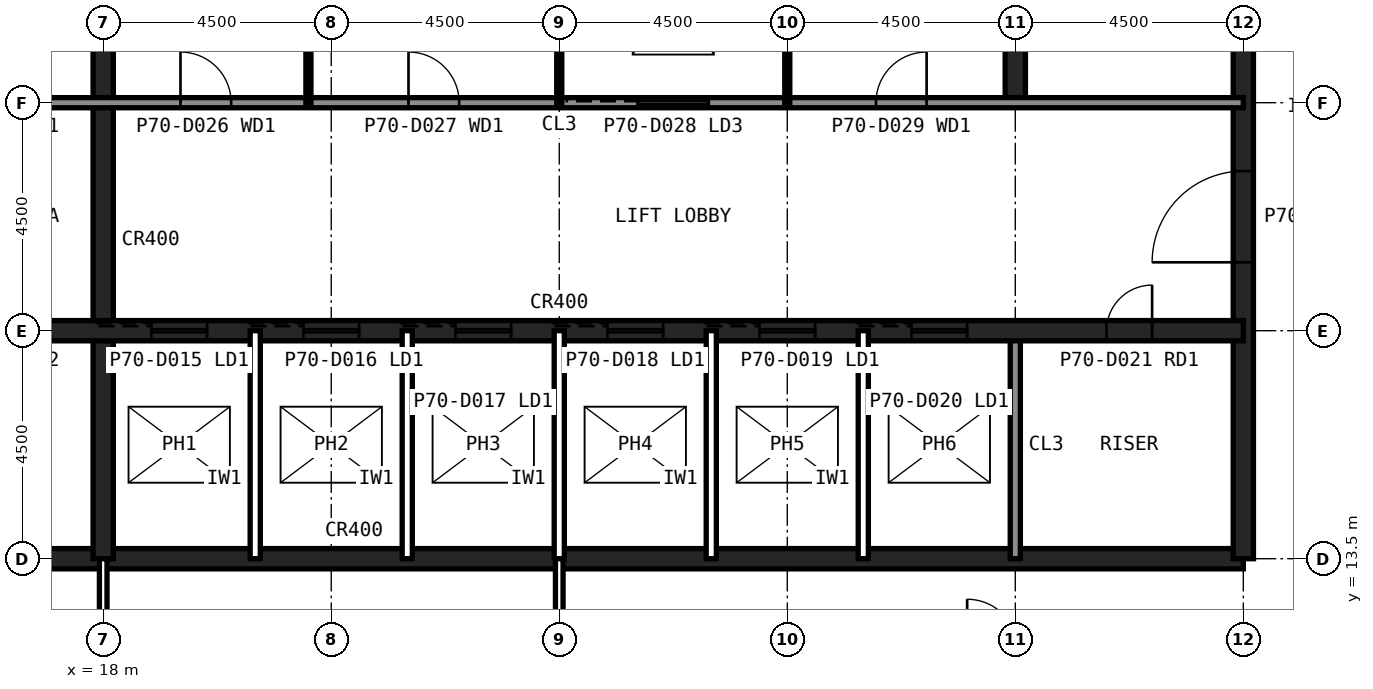
"""IFC4 building model, lengths in metres.
Left out: names, types, materials, properties, quantities, classifications, styles, units other than length and angle.
Written with IfcOpenShell. Run it as: python <this file> out.ifc"""

import sys

from ifc_helpers import new_model, si_unit, direction, frame, frame_2d, origin, place, context, subcontext, project, spatial, rectangle, extrude, element, fill, save


model = new_model("IFC4")
c1 = context("Model", 3, precision=1e-05, world=origin(), true_north=direction((0.0, 1.0)))
c2 = subcontext(c1, "Body", "Model", "MODEL_VIEW")
j1 = project(units=[si_unit("LENGTHUNIT", "METRE"), si_unit("PLANEANGLEUNIT", "RADIAN")], contexts=[c1])
p1 = place(None, origin())
s1 = spatial("IfcSite", under=j1, at=p1, CompositionType="ELEMENT")
p2 = place(p1, origin())
s2 = spatial("IfcBuilding", under=s1, at=p2, CompositionType="ELEMENT")
p3 = place(p2, frame((0.0, 0.0, 294.6)))
s3 = spatial("IfcBuildingStorey", under=s2, at=p3, CompositionType="ELEMENT", Elevation=294.6)
p4 = place(p3, frame((13.5, 13.5, 0.0), z_axis=(0.0, 0.0, 1.0), x_axis=(1.0, 0.0, 0.0)))
e1 = element("IfcWall", 1, at=p4, inside=s3, PredefinedType="SHEAR", context=c2, shape_type="SweptSolid", body=[
    extrude(rectangle(XDim=27.0, YDim=0.4, at=frame_2d((13.5, 0.0))), origin(), (0.0, 0.0, 1.0), 4.0),
])
p5 = place(p3, frame((40.5, 13.5, 0.0), z_axis=(0.0, 0.0, 1.0), x_axis=(0.0, 1.0, 0.0)))
e2 = element("IfcWall", 2, at=p5, inside=s3, PredefinedType="SHEAR", context=c2, shape_type="SweptSolid", body=[
    extrude(rectangle(XDim=27.0, YDim=0.4, at=frame_2d((13.5, 0.0))), origin(), (0.0, 0.0, 1.0), 4.0),
])
p6 = place(p5, frame((5.85, 0.0, 0.0)))
e3 = element("IfcOpeningElement", 3, at=p6, cuts=e2, PredefinedType="OPENING", context=c2, shape_type="SweptSolid", body=[
    extrude(rectangle(XDim=1.8, YDim=2.1, at=frame_2d((0.9, 1.05))), frame((0.0, 0.21, 0.0), z_axis=(0.0, -1.0, 0.0), x_axis=(1.0, 0.0, 0.0)), (0.0, 0.0, 1.0), 0.42),
])
p7 = place(p5, frame((19.65, 0.0, 0.0)))
e4 = element("IfcOpeningElement", 4, at=p7, cuts=e2, PredefinedType="OPENING", context=c2, shape_type="SweptSolid", body=[
    extrude(rectangle(XDim=1.2, YDim=2.1, at=frame_2d((0.6, 1.05))), frame((0.0, 0.21, 0.0), z_axis=(0.0, -1.0, 0.0), x_axis=(1.0, 0.0, 0.0)), (0.0, 0.0, 1.0), 0.42),
])
p8 = place(p3, frame((18.0, 13.5, 0.0), z_axis=(0.0, 0.0, 1.0), x_axis=(0.0, 1.0, 0.0)))
e5 = element("IfcWall", 5, at=p8, inside=s3, PredefinedType="SHEAR", context=c2, shape_type="SweptSolid", body=[
    extrude(rectangle(XDim=18.0, YDim=0.4, at=frame_2d((9.0, 0.0))), origin(), (0.0, 0.0, 1.0), 4.0),
])
p9 = place(p3, frame((36.0, 13.5, 0.0), z_axis=(0.0, 0.0, 1.0), x_axis=(0.0, 1.0, 0.0)))
e6 = element("IfcWall", 6, at=p9, inside=s3, PredefinedType="SOLIDWALL", context=c2, shape_type="SweptSolid", body=[
    extrude(rectangle(XDim=4.5, YDim=0.2, at=frame_2d((2.25, 0.0))), origin(), (0.0, 0.0, 1.0), 3.84),
])
p10 = place(p3, frame((36.0, 22.5, 0.0), z_axis=(0.0, 0.0, 1.0), x_axis=(0.0, 1.0, 0.0)))
e7 = element("IfcWall", 7, at=p10, inside=s3, PredefinedType="SHEAR", context=c2, shape_type="SweptSolid", body=[
    extrude(rectangle(XDim=18.0, YDim=0.4, at=frame_2d((9.0, 0.0))), origin(), (0.0, 0.0, 1.0), 4.0),
])
p11 = place(p3, frame((13.5, 18.0, 0.0), z_axis=(0.0, 0.0, 1.0), x_axis=(1.0, 0.0, 0.0)))
e8 = element("IfcWall", 8, at=p11, inside=s3, PredefinedType="SHEAR", context=c2, shape_type="SweptSolid", body=[
    extrude(rectangle(XDim=27.0, YDim=0.4, at=frame_2d((13.5, 0.0))), origin(), (0.0, 0.0, 1.0), 4.0),
])
p12 = place(p11, frame((24.3, 0.0, 0.0)))
e9 = element("IfcOpeningElement", 9, at=p12, cuts=e8, PredefinedType="OPENING", context=c2, shape_type="SweptSolid", body=[
    extrude(rectangle(XDim=0.9, YDim=2.1, at=frame_2d((0.45, 1.05))), frame((0.0, 0.21, 0.0), z_axis=(0.0, -1.0, 0.0), x_axis=(1.0, 0.0, 0.0)), (0.0, 0.0, 1.0), 0.42),
])
p13 = place(p11, frame((5.45, 0.0, 0.0)))
e10 = element("IfcOpeningElement", 10, at=p13, cuts=e8, PredefinedType="OPENING", context=c2, shape_type="SweptSolid", body=[
    extrude(rectangle(XDim=1.1, YDim=2.1, at=frame_2d((0.55, 1.05))), frame((0.0, 0.21, 0.0), z_axis=(0.0, -1.0, 0.0), x_axis=(1.0, 0.0, 0.0)), (0.0, 0.0, 1.0), 0.42),
])
p14 = place(p11, frame((8.45, 0.0, 0.0)))
e11 = element("IfcOpeningElement", 11, at=p14, cuts=e8, PredefinedType="OPENING", context=c2, shape_type="SweptSolid", body=[
    extrude(rectangle(XDim=1.1, YDim=2.1, at=frame_2d((0.55, 1.05))), frame((0.0, 0.21, 0.0), z_axis=(0.0, -1.0, 0.0), x_axis=(1.0, 0.0, 0.0)), (0.0, 0.0, 1.0), 0.42),
])
p15 = place(p11, frame((11.45, 0.0, 0.0)))
e12 = element("IfcOpeningElement", 12, at=p15, cuts=e8, PredefinedType="OPENING", context=c2, shape_type="SweptSolid", body=[
    extrude(rectangle(XDim=1.1, YDim=2.1, at=frame_2d((0.55, 1.05))), frame((0.0, 0.21, 0.0), z_axis=(0.0, -1.0, 0.0), x_axis=(1.0, 0.0, 0.0)), (0.0, 0.0, 1.0), 0.42),
])
p16 = place(p11, frame((14.45, 0.0, 0.0)))
e13 = element("IfcOpeningElement", 13, at=p16, cuts=e8, PredefinedType="OPENING", context=c2, shape_type="SweptSolid", body=[
    extrude(rectangle(XDim=1.1, YDim=2.1, at=frame_2d((0.55, 1.05))), frame((0.0, 0.21, 0.0), z_axis=(0.0, -1.0, 0.0), x_axis=(1.0, 0.0, 0.0)), (0.0, 0.0, 1.0), 0.42),
])
p17 = place(p11, frame((17.45, 0.0, 0.0)))
e14 = element("IfcOpeningElement", 14, at=p17, cuts=e8, PredefinedType="OPENING", context=c2, shape_type="SweptSolid", body=[
    extrude(rectangle(XDim=1.1, YDim=2.1, at=frame_2d((0.55, 1.05))), frame((0.0, 0.21, 0.0), z_axis=(0.0, -1.0, 0.0), x_axis=(1.0, 0.0, 0.0)), (0.0, 0.0, 1.0), 0.42),
])
p18 = place(p11, frame((20.45, 0.0, 0.0)))
e15 = element("IfcOpeningElement", 15, at=p18, cuts=e8, PredefinedType="OPENING", context=c2, shape_type="SweptSolid", body=[
    extrude(rectangle(XDim=1.1, YDim=2.1, at=frame_2d((0.55, 1.05))), frame((0.0, 0.21, 0.0), z_axis=(0.0, -1.0, 0.0), x_axis=(1.0, 0.0, 0.0)), (0.0, 0.0, 1.0), 0.42),
])
p19 = place(p11, frame((1.6, 0.0, 0.0)))
e16 = element("IfcOpeningElement", 16, at=p19, cuts=e8, PredefinedType="OPENING", context=c2, shape_type="SweptSolid", body=[
    extrude(rectangle(XDim=1.3, YDim=2.2, at=frame_2d((0.65, 1.1))), frame((0.0, 0.21, 0.0), z_axis=(0.0, -1.0, 0.0), x_axis=(1.0, 0.0, 0.0)), (0.0, 0.0, 1.0), 0.42),
])
p20 = place(p3, frame((13.5, 22.5, 0.0), z_axis=(0.0, 0.0, 1.0), x_axis=(1.0, 0.0, 0.0)))
e17 = element("IfcWall", 17, at=p20, inside=s3, PredefinedType="SOLIDWALL", context=c2, shape_type="SweptSolid", body=[
    extrude(rectangle(XDim=27.0, YDim=0.2, at=frame_2d((13.5, 0.0))), origin(), (0.0, 0.0, 1.0), 3.84),
])
p21 = place(p20, frame((1.65, 0.0, 0.0)))
e18 = element("IfcOpeningElement", 18, at=p21, cuts=e17, PredefinedType="OPENING", context=c2, shape_type="SweptSolid", body=[
    extrude(rectangle(XDim=1.2, YDim=2.1, at=frame_2d((0.6, 1.05))), frame((0.0, 0.11, 0.0), z_axis=(0.0, -1.0, 0.0), x_axis=(1.0, 0.0, 0.0)), (0.0, 0.0, 1.0), 0.22),
])
p22 = place(p20, frame((6.025, 0.0, 0.0)))
e19 = element("IfcOpeningElement", 19, at=p22, cuts=e17, PredefinedType="OPENING", context=c2, shape_type="SweptSolid", body=[
    extrude(rectangle(XDim=1.0, YDim=2.1, at=frame_2d((0.5, 1.05))), frame((0.0, 0.11, 0.0), z_axis=(0.0, -1.0, 0.0), x_axis=(1.0, 0.0, 0.0)), (0.0, 0.0, 1.0), 0.22),
])
p23 = place(p20, frame((10.525, 0.0, 0.0)))
e20 = element("IfcOpeningElement", 20, at=p23, cuts=e17, PredefinedType="OPENING", context=c2, shape_type="SweptSolid", body=[
    extrude(rectangle(XDim=1.0, YDim=2.1, at=frame_2d((0.5, 1.05))), frame((0.0, 0.11, 0.0), z_axis=(0.0, -1.0, 0.0), x_axis=(1.0, 0.0, 0.0)), (0.0, 0.0, 1.0), 0.22),
])
p24 = place(p20, frame((19.75, 0.0, 0.0)))
e21 = element("IfcOpeningElement", 21, at=p24, cuts=e17, PredefinedType="OPENING", context=c2, shape_type="SweptSolid", body=[
    extrude(rectangle(XDim=1.0, YDim=2.1, at=frame_2d((0.5, 1.05))), frame((0.0, 0.11, 0.0), z_axis=(0.0, -1.0, 0.0), x_axis=(1.0, 0.0, 0.0)), (0.0, 0.0, 1.0), 0.22),
])
p25 = place(p20, frame((15.05, 0.0, 0.0)))
e22 = element("IfcOpeningElement", 22, at=p25, cuts=e17, PredefinedType="OPENING", context=c2, shape_type="SweptSolid", body=[
    extrude(rectangle(XDim=1.4, YDim=2.4, at=frame_2d((0.7, 1.2))), frame((0.0, 0.11, 0.0), z_axis=(0.0, -1.0, 0.0), x_axis=(1.0, 0.0, 0.0)), (0.0, 0.0, 1.0), 0.22),
])
for number, where, z_axis, x_axis in (
    (23, (21.0, 13.5, 0.0), (0.0, 0.0, 1.0), (0.0, 1.0, 0.0)),
    (24, (24.0, 13.5, 0.0), (0.0, 0.0, 1.0), (0.0, 1.0, 0.0)),
    (25, (27.0, 13.5, 0.0), (0.0, 0.0, 1.0), (0.0, 1.0, 0.0)),
    (26, (30.0, 13.5, 0.0), (0.0, 0.0, 1.0), (0.0, 1.0, 0.0)),
    (27, (33.0, 13.5, 0.0), (0.0, 0.0, 1.0), (0.0, 1.0, 0.0)),
):
    element("IfcWall", number, at=place(p3, frame(where, z_axis=z_axis, x_axis=x_axis)), inside=s3, PredefinedType="PARTITIONING", context=c2, shape_type="SweptSolid", body=[
        extrude(rectangle(XDim=4.5, YDim=0.2, at=frame_2d((2.25, 0.0))), origin(), (0.0, 0.0, 1.0), 3.84),
    ])
for number, where, z_axis, x_axis in (
    (28, (22.05, 22.5, 0.0), (0.0, 0.0, 1.0), (0.0, 1.0, 0.0)),
    (29, (27.0, 22.5, 0.0), (0.0, 0.0, 1.0), (0.0, 1.0, 0.0)),
    (30, (31.5, 22.5, 0.0), (0.0, 0.0, 1.0), (0.0, 1.0, 0.0)),
):
    element("IfcWall", number, at=place(p3, frame(where, z_axis=z_axis, x_axis=x_axis)), inside=s3, PredefinedType="PLUMBINGWALL", context=c2, shape_type="SweptSolid", body=[
        extrude(rectangle(XDim=9.0, YDim=0.1, at=frame_2d((4.5, 0.0))), origin(), (0.0, 0.0, 1.0), 3.84),
    ])
p26 = place(p3, frame((27.0, 9.0, 0.0), z_axis=(0.0, 0.0, 1.0), x_axis=(0.0, 1.0, 0.0)))
e31 = element("IfcWall", 31, at=p26, inside=s3, PredefinedType="PARTITIONING", context=c2, shape_type="SweptSolid", body=[
    extrude(rectangle(XDim=4.5, YDim=0.15, at=frame_2d((2.25, 0.0))), origin(), (0.0, 0.0, 1.0), 2.989),
])
p27 = place(p26, frame((1.75, 0.0, 0.0)))
e32 = element("IfcOpeningElement", 32, at=p27, cuts=e31, PredefinedType="OPENING", context=c2, shape_type="SweptSolid", body=[
    extrude(rectangle(XDim=1.0, YDim=2.1, at=frame_2d((0.5, 1.05))), frame((0.0, 0.085, 0.0), z_axis=(0.0, -1.0, 0.0), x_axis=(1.0, 0.0, 0.0)), (0.0, 0.0, 1.0), 0.17),
])
p28 = place(p3, frame((18.0, 13.5, 0.0), z_axis=(0.0, 0.0, 1.0), x_axis=(0.0, -1.0, 0.0)))
e33 = element("IfcWall", 33, at=p28, inside=s3, PredefinedType="PARTITIONING", context=c2, shape_type="SweptSolid", body=[
    extrude(rectangle(XDim=4.5, YDim=0.15, at=frame_2d((2.25, 0.0))), origin(), (0.0, 0.0, 1.0), 2.989),
])
p29 = place(p6, origin())
e34 = element("IfcDoor", 34, at=p29, inside=s3, OperationType="SINGLE_SWING_LEFT", PredefinedType="DOOR", context=c2, shape_type="SweptSolid", body=[
    extrude(rectangle(XDim=1.8, YDim=2.1, at=frame_2d((0.9, 1.05))), frame((0.0, 0.025, 0.0), z_axis=(0.0, -1.0, 0.0), x_axis=(1.0, 0.0, 0.0)), (0.0, 0.0, 1.0), 0.05),
])
fill(e3, e34)
p30 = place(p22, origin())
e35 = element("IfcDoor", 35, at=p30, inside=s3, OperationType="SINGLE_SWING_LEFT", PredefinedType="DOOR", context=c2, shape_type="SweptSolid", body=[
    extrude(rectangle(XDim=1.0, YDim=2.1, at=frame_2d((0.5, 1.05))), frame((0.0, 0.025, 0.0), z_axis=(0.0, -1.0, 0.0), x_axis=(1.0, 0.0, 0.0)), (0.0, 0.0, 1.0), 0.05),
])
fill(e19, e35)
p31 = place(p23, origin())
e36 = element("IfcDoor", 36, at=p31, inside=s3, OperationType="SINGLE_SWING_LEFT", PredefinedType="DOOR", context=c2, shape_type="SweptSolid", body=[
    extrude(rectangle(XDim=1.0, YDim=2.1, at=frame_2d((0.5, 1.05))), frame((0.0, 0.025, 0.0), z_axis=(0.0, -1.0, 0.0), x_axis=(1.0, 0.0, 0.0)), (0.0, 0.0, 1.0), 0.05),
])
fill(e20, e36)
p32 = place(p24, origin())
e37 = element("IfcDoor", 37, at=p32, inside=s3, OperationType="SINGLE_SWING_RIGHT", PredefinedType="DOOR", context=c2, shape_type="SweptSolid", body=[
    extrude(rectangle(XDim=1.0, YDim=2.1, at=frame_2d((0.5, 1.05))), frame((0.0, 0.025, 0.0), z_axis=(0.0, -1.0, 0.0), x_axis=(1.0, 0.0, 0.0)), (0.0, 0.0, 1.0), 0.05),
])
fill(e21, e37)
p33 = place(p12, origin())
e38 = element("IfcDoor", 38, at=p33, inside=s3, OperationType="SINGLE_SWING_RIGHT", PredefinedType="DOOR", context=c2, shape_type="SweptSolid", body=[
    extrude(rectangle(XDim=0.9, YDim=2.1, at=frame_2d((0.45, 1.05))), frame((0.0, 0.025, 0.0), z_axis=(0.0, -1.0, 0.0), x_axis=(1.0, 0.0, 0.0)), (0.0, 0.0, 1.0), 0.05),
])
fill(e9, e38)
p34 = place(p13, origin())
e39 = element("IfcDoor", 39, at=p34, inside=s3, OperationType="SLIDING_TO_LEFT", PredefinedType="DOOR", context=c2, shape_type="SweptSolid", body=[
    extrude(rectangle(XDim=1.1, YDim=2.1, at=frame_2d((0.55, 1.05))), frame((0.0, 0.025, 0.0), z_axis=(0.0, -1.0, 0.0), x_axis=(1.0, 0.0, 0.0)), (0.0, 0.0, 1.0), 0.05),
])
fill(e10, e39)
p35 = place(p14, origin())
e40 = element("IfcDoor", 40, at=p35, inside=s3, OperationType="SLIDING_TO_LEFT", PredefinedType="DOOR", context=c2, shape_type="SweptSolid", body=[
    extrude(rectangle(XDim=1.1, YDim=2.1, at=frame_2d((0.55, 1.05))), frame((0.0, 0.025, 0.0), z_axis=(0.0, -1.0, 0.0), x_axis=(1.0, 0.0, 0.0)), (0.0, 0.0, 1.0), 0.05),
])
fill(e11, e40)
p36 = place(p15, origin())
e41 = element("IfcDoor", 41, at=p36, inside=s3, OperationType="SLIDING_TO_LEFT", PredefinedType="DOOR", context=c2, shape_type="SweptSolid", body=[
    extrude(rectangle(XDim=1.1, YDim=2.1, at=frame_2d((0.55, 1.05))), frame((0.0, 0.025, 0.0), z_axis=(0.0, -1.0, 0.0), x_axis=(1.0, 0.0, 0.0)), (0.0, 0.0, 1.0), 0.05),
])
fill(e12, e41)
p37 = place(p16, origin())
e42 = element("IfcDoor", 42, at=p37, inside=s3, OperationType="SLIDING_TO_LEFT", PredefinedType="DOOR", context=c2, shape_type="SweptSolid", body=[
    extrude(rectangle(XDim=1.1, YDim=2.1, at=frame_2d((0.55, 1.05))), frame((0.0, 0.025, 0.0), z_axis=(0.0, -1.0, 0.0), x_axis=(1.0, 0.0, 0.0)), (0.0, 0.0, 1.0), 0.05),
])
fill(e13, e42)
p38 = place(p17, origin())
e43 = element("IfcDoor", 43, at=p38, inside=s3, OperationType="SLIDING_TO_LEFT", PredefinedType="DOOR", context=c2, shape_type="SweptSolid", body=[
    extrude(rectangle(XDim=1.1, YDim=2.1, at=frame_2d((0.55, 1.05))), frame((0.0, 0.025, 0.0), z_axis=(0.0, -1.0, 0.0), x_axis=(1.0, 0.0, 0.0)), (0.0, 0.0, 1.0), 0.05),
])
fill(e14, e43)
p39 = place(p18, origin())
e44 = element("IfcDoor", 44, at=p39, inside=s3, OperationType="SLIDING_TO_LEFT", PredefinedType="DOOR", context=c2, shape_type="SweptSolid", body=[
    extrude(rectangle(XDim=1.1, YDim=2.1, at=frame_2d((0.55, 1.05))), frame((0.0, 0.025, 0.0), z_axis=(0.0, -1.0, 0.0), x_axis=(1.0, 0.0, 0.0)), (0.0, 0.0, 1.0), 0.05),
])
fill(e15, e44)
p40 = place(p25, origin())
e45 = element("IfcDoor", 45, at=p40, inside=s3, OperationType="SLIDING_TO_LEFT", PredefinedType="DOOR", context=c2, shape_type="SweptSolid", body=[
    extrude(rectangle(XDim=1.4, YDim=2.4, at=frame_2d((0.7, 1.2))), frame((0.0, 0.025, 0.0), z_axis=(0.0, -1.0, 0.0), x_axis=(1.0, 0.0, 0.0)), (0.0, 0.0, 1.0), 0.05),
])
fill(e22, e45)
save(model, sys.argv[1])
